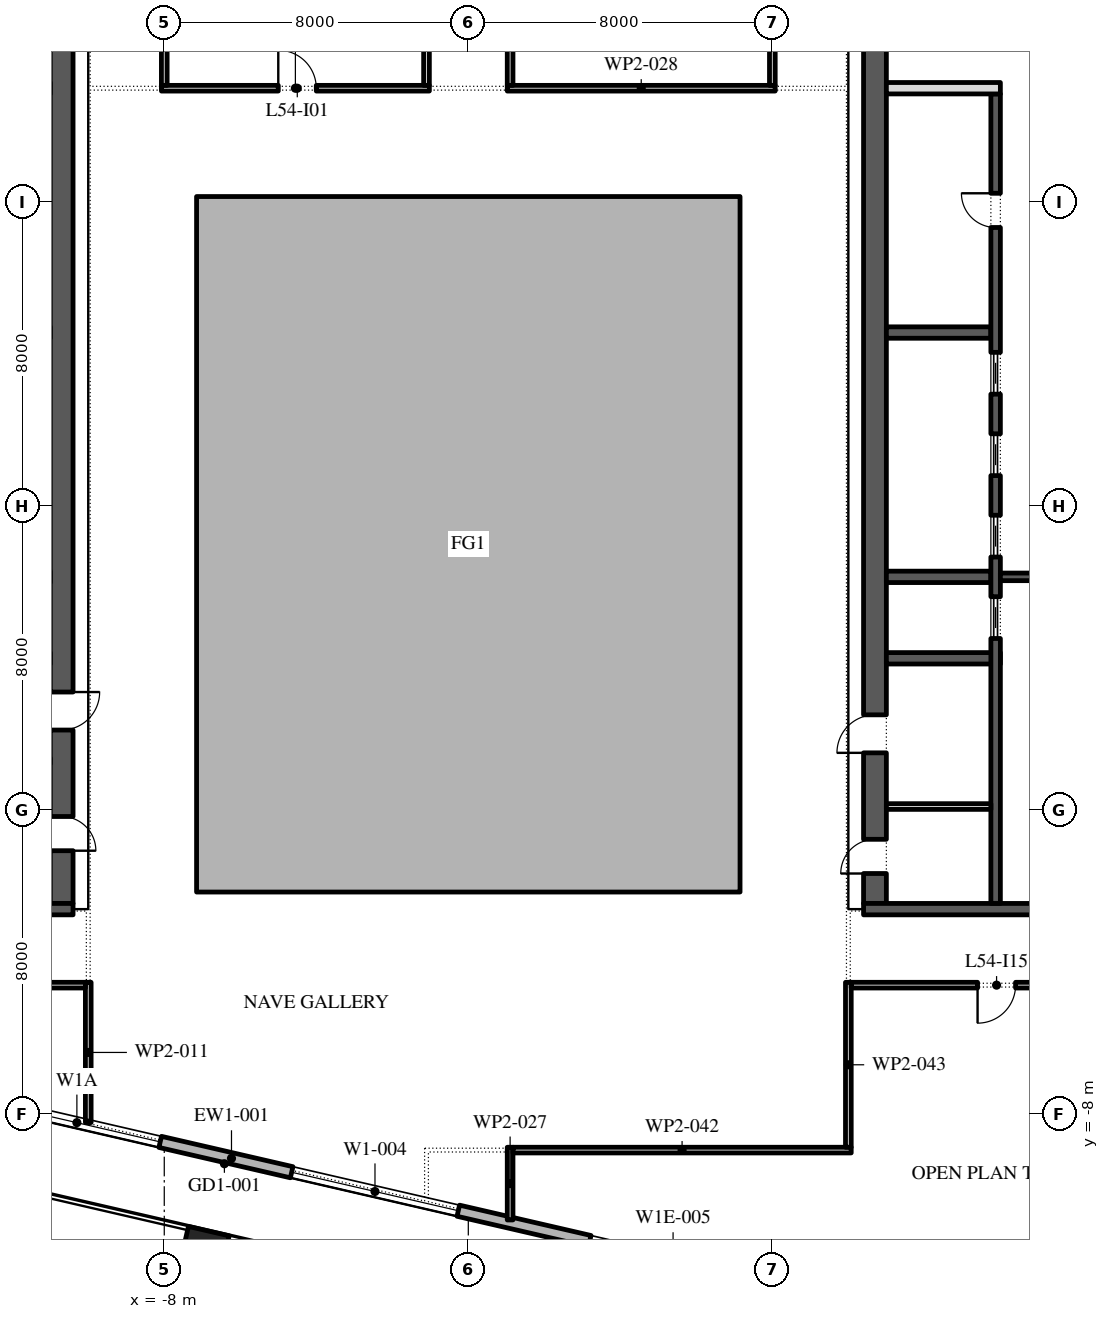
"""IFC4 building model, lengths in metres.
Left out: names, types, materials, properties, quantities, classifications, styles, units other than length and angle.
Written with IfcOpenShell. Run it as: python <this file> out.ifc"""

import sys

from ifc_helpers import new_model, si_unit, direction, frame, frame_2d, origin, origin_2d, place, context, subcontext, project, spatial, polyline, rectangle, outline, extrude, element, fill, save


model = new_model("IFC4")
c1 = context("Model", 3, precision=1e-05, world=origin(), true_north=direction((0.0, 1.0)))
c2 = subcontext(c1, "Body", "Model", "MODEL_VIEW")
j1 = project(units=[si_unit("LENGTHUNIT", "METRE"), si_unit("PLANEANGLEUNIT", "RADIAN")], contexts=[c1])
p1 = place(None, origin())
s1 = spatial("IfcSite", under=j1, at=p1, CompositionType="ELEMENT")
p2 = place(p1, origin())
s2 = spatial("IfcBuilding", under=s1, at=p2, CompositionType="ELEMENT")
p3 = place(p2, frame((0.0, 0.0, 251.4)))
s3 = spatial("IfcBuildingStorey", under=s2, at=p3, CompositionType="ELEMENT", Elevation=251.4)
p4 = place(p3, frame((-6.951, -11.608, 0.0), z_axis=(0.0, 0.0, 1.0), x_axis=(0.974370064785, -0.224951054344, 0.0)))
e1 = element("IfcColumn", 1, at=p4, inside=s3, PredefinedType="COLUMN", context=c2, shape_type="SweptSolid", body=[
    extrude(rectangle(XDim=1.1, YDim=1.1, at=origin_2d()), origin(), (0.0, 0.0, 1.0), 4.2),
])
p5 = place(p3, origin())
e2 = element("IfcWall", 2, at=p5, inside=s3, PredefinedType="STANDARD", context=c2, shape_type="SweptSolid", body=[
    extrude(outline(polyline([(-7.15, -2.15), (7.15, -2.15), (7.15, 16.15), (-7.15, 16.15), (-7.15, -2.15)]), holes=[polyline([(-7.0, -2.0), (-7.0, 16.0), (7.0, 16.0), (7.0, -2.0), (-7.0, -2.0)])]), origin(), (0.0, 0.0, 1.0), 4.0),
])
p6 = place(p3, frame((-29.616, -3.758, 0.0), z_axis=(0.0, 0.0, 1.0), x_axis=(0.974370532314, -0.224949029246, 0.0)))
e3 = element("IfcWall", 3, at=p6, inside=s3, PredefinedType="STANDARD", context=c2, shape_type="SweptSolid", body=[
    extrude(rectangle(XDim=48.0, YDim=0.3, at=frame_2d((24.0, 0.0))), origin(), (0.0, 0.0, 1.0), 4.0),
])
p7 = place(p6, frame((1.625, 0.0, 0.45)))
e4 = element("IfcOpeningElement", 4, at=p7, cuts=e3, PredefinedType="OPENING", context=c2, shape_type="SweptSolid", body=[
    extrude(rectangle(XDim=4.5, YDim=3.05, at=frame_2d((2.25, 1.525))), frame((0.0, 0.16, 0.0), z_axis=(0.0, -1.0, 0.0), x_axis=(1.0, 0.0, 0.0)), (0.0, 0.0, 1.0), 0.32),
])
p8 = place(p6, frame((10.575, 0.0, 0.0)))
e5 = element("IfcOpeningElement", 5, at=p8, cuts=e3, PredefinedType="OPENING", context=c2, shape_type="SweptSolid", body=[
    extrude(rectangle(XDim=2.4, YDim=3.5, at=frame_2d((1.2, 1.75))), frame((0.0, 0.16, 0.0), z_axis=(0.0, -1.0, 0.0), x_axis=(1.0, 0.0, 0.0)), (0.0, 0.0, 1.0), 0.32),
])
p9 = place(p6, frame((17.575, 0.0, 0.45)))
e6 = element("IfcOpeningElement", 6, at=p9, cuts=e3, PredefinedType="OPENING", context=c2, shape_type="SweptSolid", body=[
    extrude(rectangle(XDim=4.5, YDim=3.0, at=frame_2d((2.25, 1.5))), frame((0.0, 0.16, 0.0), z_axis=(0.0, -1.0, 0.0), x_axis=(1.0, 0.0, 0.0)), (0.0, 0.0, 1.0), 0.32),
])
p10 = place(p6, frame((25.625, 0.0, 0.45)))
e7 = element("IfcOpeningElement", 7, at=p10, cuts=e3, PredefinedType="OPENING", context=c2, shape_type="SweptSolid", body=[
    extrude(rectangle(XDim=4.5, YDim=3.05, at=frame_2d((2.25, 1.525))), frame((0.0, 0.16, 0.0), z_axis=(0.0, -1.0, 0.0), x_axis=(1.0, 0.0, 0.0)), (0.0, 0.0, 1.0), 0.32),
])
p11 = place(p6, frame((33.675, 0.0, 0.45)))
e8 = element("IfcOpeningElement", 8, at=p11, cuts=e3, PredefinedType="OPENING", context=c2, shape_type="SweptSolid", body=[
    extrude(rectangle(XDim=4.5, YDim=2.825, at=frame_2d((2.25, 1.413))), frame((0.0, 0.16, 0.0), z_axis=(0.0, -1.0, 0.0), x_axis=(1.0, 0.0, 0.0)), (0.0, 0.0, 1.0), 0.32),
])
p12 = place(p6, frame((42.775, 0.0, 0.0)))
e9 = element("IfcOpeningElement", 9, at=p12, cuts=e3, PredefinedType="OPENING", context=c2, shape_type="SweptSolid", body=[
    extrude(rectangle(XDim=2.4, YDim=3.5, at=frame_2d((1.2, 1.75))), frame((0.0, 0.16, 0.0), z_axis=(0.0, -1.0, 0.0), x_axis=(1.0, 0.0, 0.0)), (0.0, 0.0, 1.0), 0.32),
])
p13 = place(p3, frame((-10.7, -2.45, 0.0), z_axis=(0.0, 0.0, 1.0), x_axis=(0.0, 1.0, 0.0)))
e10 = element("IfcWall", 10, at=p13, inside=s3, PredefinedType="SHEAR", context=c2, shape_type="SweptSolid", body=[
    extrude(rectangle(XDim=27.9, YDim=0.6, at=frame_2d((13.95, 0.0))), origin(), (0.0, 0.0, 1.0), 4.0),
])
p14 = place(p13, frame((23.65, 0.0, 0.0)))
e11 = element("IfcOpeningElement", 11, at=p14, cuts=e10, PredefinedType="OPENING", context=c2, shape_type="SweptSolid", body=[
    extrude(rectangle(XDim=2.4, YDim=2.1, at=frame_2d((1.2, 1.05))), frame((0.0, 0.31, 0.0), z_axis=(0.0, -1.0, 0.0), x_axis=(1.0, 0.0, 0.0)), (0.0, 0.0, 1.0), 0.62),
])
p15 = place(p13, frame((1.387, 0.0, 0.0)))
e12 = element("IfcOpeningElement", 12, at=p15, cuts=e10, PredefinedType="OPENING", context=c2, shape_type="SweptSolid", body=[
    extrude(rectangle(XDim=0.9, YDim=2.1, at=frame_2d((0.45, 1.05))), frame((0.0, 0.31, 0.0), z_axis=(0.0, -1.0, 0.0), x_axis=(1.0, 0.0, 0.0)), (0.0, 0.0, 1.0), 0.62),
])
p16 = place(p13, frame((4.562, 0.0, 0.0)))
e13 = element("IfcOpeningElement", 13, at=p16, cuts=e10, PredefinedType="OPENING", context=c2, shape_type="SweptSolid", body=[
    extrude(rectangle(XDim=1.0, YDim=2.1, at=frame_2d((0.5, 1.05))), frame((0.0, 0.31, 0.0), z_axis=(0.0, -1.0, 0.0), x_axis=(1.0, 0.0, 0.0)), (0.0, 0.0, 1.0), 0.62),
])
p17 = place(p3, frame((-21.6, -2.6, 0.0), z_axis=(0.0, 0.0, 1.0), x_axis=(1.0, 0.0, 0.0)))
e14 = element("IfcWall", 14, at=p17, inside=s3, PredefinedType="SHEAR", context=c2, shape_type="SweptSolid", body=[
    extrude(rectangle(XDim=11.2, YDim=0.3, at=frame_2d((5.6, 0.0))), origin(), (0.0, 0.0, 1.0), 4.0),
])
p18 = place(p3, frame((10.7, -2.45, 0.0), z_axis=(0.0, 0.0, 1.0), x_axis=(0.0, 1.0, 0.0)))
e15 = element("IfcWall", 15, at=p18, inside=s3, PredefinedType="SHEAR", context=c2, shape_type="SweptSolid", body=[
    extrude(rectangle(XDim=27.9, YDim=0.6, at=frame_2d((13.95, 0.0))), origin(), (0.0, 0.0, 1.0), 4.0),
])
p19 = place(p18, frame((23.65, 0.0, 0.0)))
e16 = element("IfcOpeningElement", 16, at=p19, cuts=e15, PredefinedType="OPENING", context=c2, shape_type="SweptSolid", body=[
    extrude(rectangle(XDim=2.4, YDim=2.1, at=frame_2d((1.2, 1.05))), frame((0.0, 0.31, 0.0), z_axis=(0.0, -1.0, 0.0), x_axis=(1.0, 0.0, 0.0)), (0.0, 0.0, 1.0), 0.62),
])
p20 = place(p18, frame((0.788, 0.0, 0.0)))
e17 = element("IfcOpeningElement", 17, at=p20, cuts=e15, PredefinedType="OPENING", context=c2, shape_type="SweptSolid", body=[
    extrude(rectangle(XDim=0.9, YDim=2.1, at=frame_2d((0.45, 1.05))), frame((0.0, 0.31, 0.0), z_axis=(0.0, -1.0, 0.0), x_axis=(1.0, 0.0, 0.0)), (0.0, 0.0, 1.0), 0.62),
])
p21 = place(p18, frame((3.962, 0.0, 0.0)))
e18 = element("IfcOpeningElement", 18, at=p21, cuts=e15, PredefinedType="OPENING", context=c2, shape_type="SweptSolid", body=[
    extrude(rectangle(XDim=1.0, YDim=2.1, at=frame_2d((0.5, 1.05))), frame((0.0, 0.31, 0.0), z_axis=(0.0, -1.0, 0.0), x_axis=(1.0, 0.0, 0.0)), (0.0, 0.0, 1.0), 0.62),
])
p22 = place(p3, frame((10.4, -2.6, 0.0), z_axis=(0.0, 0.0, 1.0), x_axis=(1.0, 0.0, 0.0)))
e19 = element("IfcWall", 19, at=p22, inside=s3, PredefinedType="SHEAR", context=c2, shape_type="SweptSolid", body=[
    extrude(rectangle(XDim=11.2, YDim=0.3, at=frame_2d((5.6, 0.0))), origin(), (0.0, 0.0, 1.0), 4.0),
])
p23 = place(p3, frame((11.0, 4.0, 0.0), z_axis=(0.0, 0.0, 1.0), x_axis=(1.0, 0.0, 0.0)))
e20 = element("IfcWall", 20, at=p23, inside=s3, PredefinedType="SHEAR", context=c2, shape_type="SweptSolid", body=[
    extrude(rectangle(XDim=3.0, YDim=0.3, at=frame_2d((1.5, 0.0))), origin(), (0.0, 0.0, 1.0), 4.0),
])
for number, where, z_axis, x_axis in (
    (21, (11.0, 6.143, 0.0), (0.0, 0.0, 1.0), (1.0, 0.0, 0.0)),
    (22, (11.0, 12.571, 0.0), (0.0, 0.0, 1.0), (1.0, 0.0, 0.0)),
):
    element("IfcWall", number, at=place(p3, frame(where, z_axis=z_axis, x_axis=x_axis)), inside=s3, PredefinedType="SHEAR", context=c2, shape_type="SweptSolid", body=[
        extrude(rectangle(XDim=2.75, YDim=0.3, at=frame_2d((1.375, 0.0))), origin(), (0.0, 0.0, 1.0), 4.0),
    ])
p24 = place(p3, frame((13.875, -2.45, 0.0), z_axis=(0.0, 0.0, 1.0), x_axis=(0.0, 1.0, 0.0)))
e23 = element("IfcWall", 23, at=p24, inside=s3, PredefinedType="SHEAR", context=c2, shape_type="SweptSolid", body=[
    extrude(rectangle(XDim=21.3, YDim=0.25, at=frame_2d((10.65, 0.0))), origin(), (0.0, 0.0, 1.0), 4.0),
])
p25 = place(p24, frame((17.786, 0.0, 0.0)))
e24 = element("IfcOpeningElement", 24, at=p25, cuts=e23, PredefinedType="OPENING", context=c2, shape_type="SweptSolid", body=[
    extrude(rectangle(XDim=0.9, YDim=2.1, at=frame_2d((0.45, 1.05))), frame((0.0, 0.135, 0.0), z_axis=(0.0, -1.0, 0.0), x_axis=(1.0, 0.0, 0.0)), (0.0, 0.0, 1.0), 0.27),
])
p26 = place(p24, frame((6.971, 0.0, 0.0)))
e25 = element("IfcOpeningElement", 25, at=p26, cuts=e23, PredefinedType="OPENING", context=c2, shape_type="SweptSolid", body=[
    extrude(rectangle(XDim=1.1, YDim=2.1, at=frame_2d((0.55, 1.05))), frame((0.0, 0.135, 0.0), z_axis=(0.0, -1.0, 0.0), x_axis=(1.0, 0.0, 0.0)), (0.0, 0.0, 1.0), 0.27),
])
p27 = place(p24, frame((9.114, 0.0, 0.0)))
e26 = element("IfcOpeningElement", 26, at=p27, cuts=e23, PredefinedType="OPENING", context=c2, shape_type="SweptSolid", body=[
    extrude(rectangle(XDim=1.1, YDim=2.1, at=frame_2d((0.55, 1.05))), frame((0.0, 0.135, 0.0), z_axis=(0.0, -1.0, 0.0), x_axis=(1.0, 0.0, 0.0)), (0.0, 0.0, 1.0), 0.27),
])
p28 = place(p24, frame((11.257, 0.0, 0.0)))
e27 = element("IfcOpeningElement", 27, at=p28, cuts=e23, PredefinedType="OPENING", context=c2, shape_type="SweptSolid", body=[
    extrude(rectangle(XDim=1.1, YDim=2.1, at=frame_2d((0.55, 1.05))), frame((0.0, 0.135, 0.0), z_axis=(0.0, -1.0, 0.0), x_axis=(1.0, 0.0, 0.0)), (0.0, 0.0, 1.0), 0.27),
])
p29 = place(p24, frame((13.4, 0.0, 0.0)))
e28 = element("IfcOpeningElement", 28, at=p29, cuts=e23, PredefinedType="OPENING", context=c2, shape_type="SweptSolid", body=[
    extrude(rectangle(XDim=1.1, YDim=2.1, at=frame_2d((0.55, 1.05))), frame((0.0, 0.135, 0.0), z_axis=(0.0, -1.0, 0.0), x_axis=(1.0, 0.0, 0.0)), (0.0, 0.0, 1.0), 0.27),
])
p30 = place(p3, frame((11.0, 19.0, 0.0), z_axis=(0.0, 0.0, 1.0), x_axis=(1.0, 0.0, 0.0)))
e29 = element("IfcWall", 29, at=p30, inside=s3, PredefinedType="PARTITIONING", context=c2, shape_type="SweptSolid", body=[
    extrude(rectangle(XDim=3.0, YDim=0.3, at=frame_2d((1.5, 0.0))), origin(), (0.0, 0.0, 1.0), 4.0),
])
p31 = place(p3, frame((14.0, 6.143, 0.0), z_axis=(0.0, 0.0, 1.0), x_axis=(1.0, 0.0, 0.0)))
e30 = element("IfcWall", 30, at=p31, inside=s3, PredefinedType="SHEAR", context=c2, shape_type="SweptSolid", body=[
    extrude(rectangle(XDim=4.0, YDim=0.2, at=frame_2d((2.0, 0.0))), origin(), (0.0, 0.0, 1.0), 4.0),
])
p32 = place(p31, frame((1.4, 0.0, 0.0)))
e31 = element("IfcOpeningElement", 31, at=p32, cuts=e30, PredefinedType="OPENING", context=c2, shape_type="SweptSolid", body=[
    extrude(rectangle(XDim=1.2, YDim=2.1, at=frame_2d((0.6, 1.05))), frame((0.0, 0.11, 0.0), z_axis=(0.0, -1.0, 0.0), x_axis=(1.0, 0.0, 0.0)), (0.0, 0.0, 1.0), 0.22),
])
p33 = place(p3, frame((11.0, 0.1, 0.0), z_axis=(0.0, 0.0, 1.0), x_axis=(1.0, 0.0, 0.0)))
e32 = element("IfcWall", 32, at=p33, inside=s3, PredefinedType="PARTITIONING", context=c2, shape_type="SweptSolid", body=[
    extrude(rectangle(XDim=2.75, YDim=0.15, at=frame_2d((1.375, 0.0))), origin(), (0.0, 0.0, 1.0), 4.0),
])
p34 = place(p3, frame((-10.0, -8.216, 0.0), z_axis=(0.0, 0.0, 1.0), x_axis=(0.0, 1.0, 0.0)))
e33 = element("IfcWall", 33, at=p34, inside=s3, PredefinedType="PARTITIONING", context=c2, shape_type="SweptSolid", body=[
    extrude(rectangle(XDim=3.691, YDim=0.15, at=frame_2d((1.846, 0.0))), origin(), (0.0, 0.0, 1.0), 4.0),
])
p35 = place(p3, frame((-10.075, -4.6, 0.0), z_axis=(0.0, 0.0, 1.0), x_axis=(-1.0, 0.0, 0.0)))
e34 = element("IfcWall", 34, at=p35, inside=s3, PredefinedType="PARTITIONING", context=c2, shape_type="SweptSolid", body=[
    extrude(rectangle(XDim=11.86, YDim=0.15, at=frame_2d((5.93, 0.0))), origin(), (0.0, 0.0, 1.0), 4.0),
])
p36 = place(p3, frame((-8.075, 19.0, 0.0), z_axis=(0.0, 0.0, 1.0), x_axis=(1.0, 0.0, 0.0)))
e35 = element("IfcWall", 35, at=p36, inside=s3, PredefinedType="PARTITIONING", context=c2, shape_type="SweptSolid", body=[
    extrude(rectangle(XDim=7.05, YDim=0.15, at=frame_2d((3.525, 0.0))), origin(), (0.0, 0.0, 1.0), 4.0),
])
p37 = place(p36, frame((3.075, 0.0, 0.0)))
e36 = element("IfcOpeningElement", 36, at=p37, cuts=e35, PredefinedType="OPENING", context=c2, shape_type="SweptSolid", body=[
    extrude(rectangle(XDim=1.0, YDim=2.1, at=frame_2d((0.5, 1.05))), frame((0.0, 0.085, 0.0), z_axis=(0.0, -1.0, 0.0), x_axis=(1.0, 0.0, 0.0)), (0.0, 0.0, 1.0), 0.17),
])
p38 = place(p3, frame((-8.0, 25.0, 0.0), z_axis=(0.0, 0.0, 1.0), x_axis=(0.0, -1.0, 0.0)))
e37 = element("IfcWall", 37, at=p38, inside=s3, PredefinedType="PARTITIONING", context=c2, shape_type="SweptSolid", body=[
    extrude(rectangle(XDim=5.925, YDim=0.15, at=frame_2d((2.962, 0.0))), origin(), (0.0, 0.0, 1.0), 4.0),
])
p39 = place(p3, frame((-1.1, 19.075, 0.0), z_axis=(0.0, 0.0, 1.0), x_axis=(0.0, 1.0, 0.0)))
e38 = element("IfcWall", 38, at=p39, inside=s3, PredefinedType="PARTITIONING", context=c2, shape_type="SweptSolid", body=[
    extrude(rectangle(XDim=5.875, YDim=0.15, at=frame_2d((2.938, 0.0))), origin(), (0.0, 0.0, 1.0), 4.0),
])
p40 = place(p3, frame((1.1, -8.865, 0.0), z_axis=(0.0, 0.0, 1.0), x_axis=(0.0, -1.0, 0.0)))
e39 = element("IfcWall", 39, at=p40, inside=s3, PredefinedType="PARTITIONING", context=c2, shape_type="SweptSolid", body=[
    extrude(rectangle(XDim=1.913, YDim=0.15, at=frame_2d((0.957, 0.0))), origin(), (0.0, 0.0, 1.0), 4.0),
])
p41 = place(p3, frame((1.025, 19.0, 0.0), z_axis=(0.0, 0.0, 1.0), x_axis=(1.0, 0.0, 0.0)))
e40 = element("IfcWall", 40, at=p41, inside=s3, PredefinedType="PARTITIONING", context=c2, shape_type="SweptSolid", body=[
    extrude(rectangle(XDim=7.05, YDim=0.15, at=frame_2d((3.525, 0.0))), origin(), (0.0, 0.0, 1.0), 4.0),
])
p42 = place(p3, frame((1.1, 28.05, 0.0), z_axis=(0.0, 0.0, 1.0), x_axis=(0.0, -1.0, 0.0)))
e41 = element("IfcWall", 41, at=p42, inside=s3, PredefinedType="PARTITIONING", context=c2, shape_type="SweptSolid", body=[
    extrude(rectangle(XDim=8.975, YDim=0.15, at=frame_2d((4.488, 0.0))), origin(), (0.0, 0.0, 1.0), 4.0),
])
p43 = place(p3, frame((8.0, 19.075, 0.0), z_axis=(0.0, 0.0, 1.0), x_axis=(0.0, 1.0, 0.0)))
e42 = element("IfcWall", 42, at=p43, inside=s3, PredefinedType="PARTITIONING", context=c2, shape_type="SweptSolid", body=[
    extrude(rectangle(XDim=8.875, YDim=0.15, at=frame_2d((4.438, 0.0))), origin(), (0.0, 0.0, 1.0), 4.0),
])
p44 = place(p43, frame((4.775, 0.0, 0.0)))
e43 = element("IfcOpeningElement", 43, at=p44, cuts=e42, PredefinedType="OPENING", context=c2, shape_type="SweptSolid", body=[
    extrude(rectangle(XDim=1.0, YDim=2.1, at=frame_2d((0.5, 1.05))), frame((0.0, 0.085, 0.0), z_axis=(0.0, -1.0, 0.0), x_axis=(1.0, 0.0, 0.0)), (0.0, 0.0, 1.0), 0.17),
])
p45 = place(p3, frame((10.075, -8.94, 0.0), z_axis=(0.0, 0.0, 1.0), x_axis=(-1.0, 0.0, 0.0)))
e44 = element("IfcWall", 44, at=p45, inside=s3, PredefinedType="PARTITIONING", context=c2, shape_type="SweptSolid", body=[
    extrude(rectangle(XDim=8.9, YDim=0.15, at=frame_2d((4.45, 0.0))), origin(), (0.0, 0.0, 1.0), 4.0),
])
p46 = place(p3, frame((10.0, -4.525, 0.0), z_axis=(0.0, 0.0, 1.0), x_axis=(0.0, -1.0, 0.0)))
e45 = element("IfcWall", 45, at=p46, inside=s3, PredefinedType="PARTITIONING", context=c2, shape_type="SweptSolid", body=[
    extrude(rectangle(XDim=4.34, YDim=0.15, at=frame_2d((2.17, 0.0))), origin(), (0.0, 0.0, 1.0), 4.0),
])
p47 = place(p3, frame((22.922, -4.6, 0.0), z_axis=(0.0, 0.0, 1.0), x_axis=(-1.0, 0.0, 0.0)))
e46 = element("IfcWall", 46, at=p47, inside=s3, PredefinedType="PARTITIONING", context=c2, shape_type="SweptSolid", body=[
    extrude(rectangle(XDim=12.847, YDim=0.15, at=frame_2d((6.424, 0.0))), origin(), (0.0, 0.0, 1.0), 4.0),
])
p48 = place(p47, frame((8.522, 0.0, 0.0)))
e47 = element("IfcOpeningElement", 47, at=p48, cuts=e46, PredefinedType="OPENING", context=c2, shape_type="SweptSolid", body=[
    extrude(rectangle(XDim=1.0, YDim=2.1, at=frame_2d((0.5, 1.05))), frame((0.0, 0.085, 0.0), z_axis=(0.0, -1.0, 0.0), x_axis=(1.0, 0.0, 0.0)), (0.0, 0.0, 1.0), 0.17),
])
p49 = place(p9, origin())
e48 = element("IfcWindow", 48, at=p49, inside=s3, PartitioningType="DOUBLE_PANEL_VERTICAL", PredefinedType="WINDOW", context=c2, shape_type="SweptSolid", body=[
    extrude(rectangle(XDim=4.5, YDim=3.0, at=frame_2d((2.25, 1.5))), frame((0.0, 0.03, 0.0), z_axis=(0.0, -1.0, 0.0), x_axis=(1.0, 0.0, 0.0)), (0.0, 0.0, 1.0), 0.06),
])
fill(e6, e48)
p50 = place(p10, origin())
e49 = element("IfcWindow", 49, at=p50, inside=s3, PartitioningType="DOUBLE_PANEL_VERTICAL", PredefinedType="WINDOW", context=c2, shape_type="SweptSolid", body=[
    extrude(rectangle(XDim=4.5, YDim=3.05, at=frame_2d((2.25, 1.525))), frame((0.0, 0.03, 0.0), z_axis=(0.0, -1.0, 0.0), x_axis=(1.0, 0.0, 0.0)), (0.0, 0.0, 1.0), 0.06),
])
fill(e7, e49)
p51 = place(p25, origin())
e50 = element("IfcDoor", 50, at=p51, inside=s3, OperationType="SINGLE_SWING_LEFT", PredefinedType="DOOR", context=c2, shape_type="SweptSolid", body=[
    extrude(rectangle(XDim=0.9, YDim=2.1, at=frame_2d((0.45, 1.05))), frame((0.0, 0.125, 0.0), z_axis=(0.0, -1.0, 0.0), x_axis=(1.0, 0.0, 0.0)), (0.0, 0.0, 1.0), 0.05),
])
fill(e24, e50)
p52 = place(p26, origin())
e51 = element("IfcDoor", 51, at=p52, inside=s3, OperationType="SLIDING_TO_LEFT", PredefinedType="DOOR", context=c2, shape_type="SweptSolid", body=[
    extrude(rectangle(XDim=1.1, YDim=2.1, at=frame_2d((0.55, 1.05))), frame((0.0, 0.025, 0.0), z_axis=(0.0, -1.0, 0.0), x_axis=(1.0, 0.0, 0.0)), (0.0, 0.0, 1.0), 0.05),
])
fill(e25, e51)
p53 = place(p27, origin())
e52 = element("IfcDoor", 52, at=p53, inside=s3, OperationType="SLIDING_TO_LEFT", PredefinedType="DOOR", context=c2, shape_type="SweptSolid", body=[
    extrude(rectangle(XDim=1.1, YDim=2.1, at=frame_2d((0.55, 1.05))), frame((0.0, 0.025, 0.0), z_axis=(0.0, -1.0, 0.0), x_axis=(1.0, 0.0, 0.0)), (0.0, 0.0, 1.0), 0.05),
])
fill(e26, e52)
p54 = place(p28, origin())
e53 = element("IfcDoor", 53, at=p54, inside=s3, OperationType="SLIDING_TO_LEFT", PredefinedType="DOOR", context=c2, shape_type="SweptSolid", body=[
    extrude(rectangle(XDim=1.1, YDim=2.1, at=frame_2d((0.55, 1.05))), frame((0.0, 0.025, 0.0), z_axis=(0.0, -1.0, 0.0), x_axis=(1.0, 0.0, 0.0)), (0.0, 0.0, 1.0), 0.05),
])
fill(e27, e53)
p55 = place(p29, origin())
e54 = element("IfcDoor", 54, at=p55, inside=s3, OperationType="SLIDING_TO_LEFT", PredefinedType="DOOR", context=c2, shape_type="SweptSolid", body=[
    extrude(rectangle(XDim=1.1, YDim=2.1, at=frame_2d((0.55, 1.05))), frame((0.0, 0.025, 0.0), z_axis=(0.0, -1.0, 0.0), x_axis=(1.0, 0.0, 0.0)), (0.0, 0.0, 1.0), 0.05),
])
fill(e28, e54)
p56 = place(p20, origin())
e55 = element("IfcDoor", 55, at=p56, inside=s3, OperationType="SINGLE_SWING_RIGHT", PredefinedType="DOOR", context=c2, shape_type="SweptSolid", body=[
    extrude(rectangle(XDim=0.9, YDim=2.1, at=frame_2d((0.45, 1.05))), frame((0.0, -0.25, 0.0), z_axis=(0.0, -1.0, 0.0), x_axis=(1.0, 0.0, 0.0)), (0.0, 0.0, 1.0), 0.05),
])
fill(e17, e55)
p57 = place(p21, origin())
e56 = element("IfcDoor", 56, at=p57, inside=s3, OperationType="SINGLE_SWING_RIGHT", PredefinedType="DOOR", context=c2, shape_type="SweptSolid", body=[
    extrude(rectangle(XDim=1.0, YDim=2.1, at=frame_2d((0.5, 1.05))), frame((0.0, -0.25, 0.0), z_axis=(0.0, -1.0, 0.0), x_axis=(1.0, 0.0, 0.0)), (0.0, 0.0, 1.0), 0.05),
])
fill(e18, e56)
p58 = place(p37, origin())
e57 = element("IfcDoor", 57, at=p58, inside=s3, OperationType="SINGLE_SWING_RIGHT", PredefinedType="DOOR", context=c2, shape_type="SweptSolid", body=[
    extrude(rectangle(XDim=1.0, YDim=2.1, at=frame_2d((0.5, 1.05))), frame((0.0, 0.025, 0.0), z_axis=(0.0, -1.0, 0.0), x_axis=(1.0, 0.0, 0.0)), (0.0, 0.0, 1.0), 0.05),
])
fill(e36, e57)
p59 = place(p48, origin())
e58 = element("IfcDoor", 58, at=p59, inside=s3, OperationType="SINGLE_SWING_LEFT", PredefinedType="DOOR", context=c2, shape_type="SweptSolid", body=[
    extrude(rectangle(XDim=1.0, YDim=2.1, at=frame_2d((0.5, 1.05))), frame((0.0, 0.025, 0.0), z_axis=(0.0, -1.0, 0.0), x_axis=(1.0, 0.0, 0.0)), (0.0, 0.0, 1.0), 0.05),
])
fill(e47, e58)
save(model, sys.argv[1])
